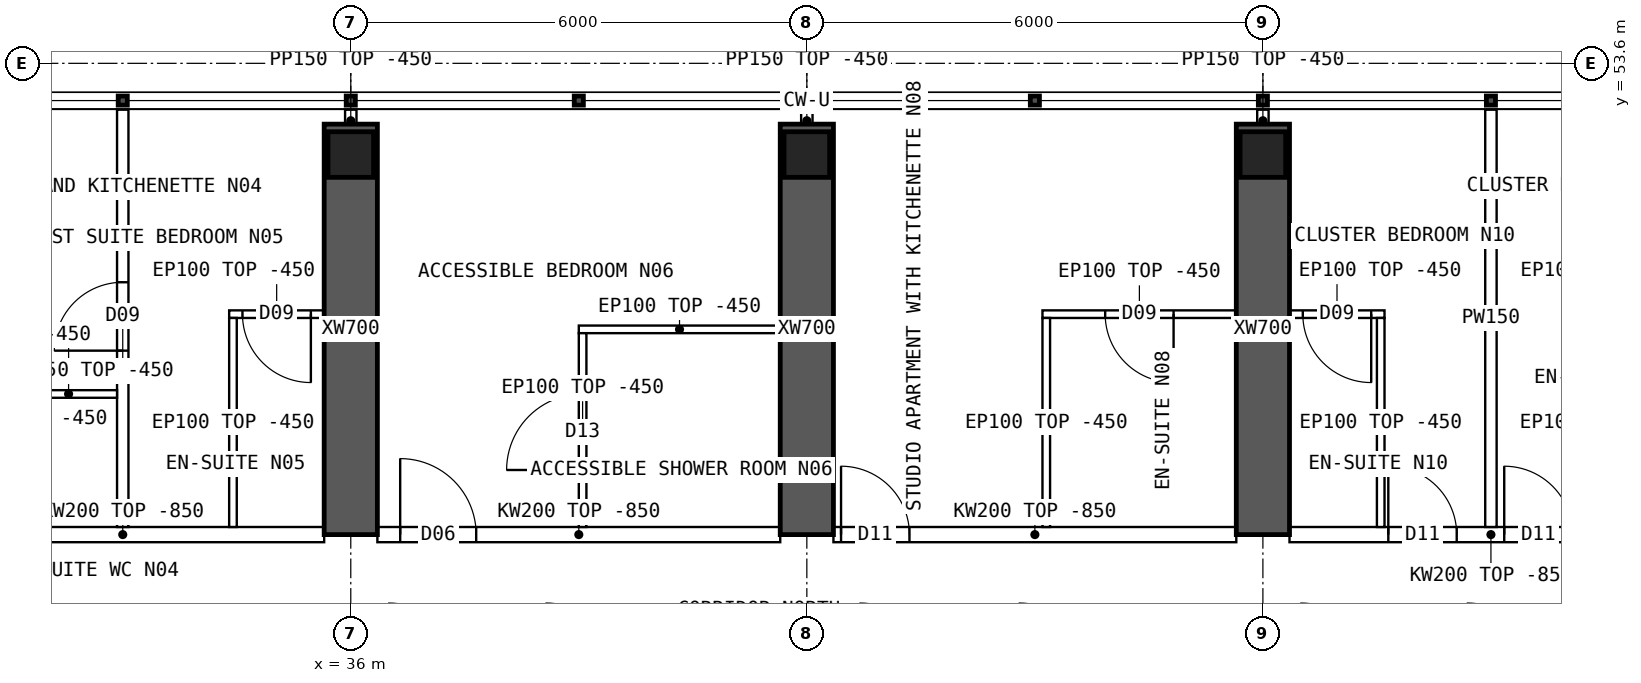
"""IFC4 building model, lengths in metres.
Left out: names, types, materials, properties, quantities, classifications, styles, units other than length and angle.
Written with IfcOpenShell. Run it as: python <this file> out.ifc"""

import sys

from ifc_helpers import new_model, si_unit, direction, frame, frame_2d, origin, origin_2d, place, context, subcontext, project, spatial, polyline, rectangle, hollow_rectangle, outline, extrude, element, fill, save


model = new_model("IFC4")
c1 = context("Model", 3, precision=1e-05, world=origin(), true_north=direction((0.0, 1.0)))
c2 = subcontext(c1, "Body", "Model", "MODEL_VIEW")
j1 = project(units=[si_unit("LENGTHUNIT", "METRE"), si_unit("PLANEANGLEUNIT", "RADIAN")], contexts=[c1])
p1 = place(None, origin())
s1 = spatial("IfcSite", under=j1, at=p1, CompositionType="ELEMENT")
p2 = place(p1, origin())
s2 = spatial("IfcBuilding", under=s1, at=p2, CompositionType="ELEMENT")
p3 = place(p2, frame((0.0, 0.0, 242.8)))
s3 = spatial("IfcBuildingStorey", under=s2, at=p3, CompositionType="ELEMENT", Elevation=242.8)
for number, where, z_axis, x_axis in (
    (1, (36.0, 52.4, 0.0), (0.0, 0.0, 1.0), (1.0, 0.0, 0.0)),
    (2, (42.0, 52.4, 0.0), (0.0, 0.0, 1.0), (1.0, 0.0, 0.0)),
    (3, (48.0, 52.4, 0.0), (0.0, 0.0, 1.0), (1.0, 0.0, 0.0)),
):
    element("IfcColumn", number, at=place(p3, frame(where, z_axis=z_axis, x_axis=x_axis)), inside=s3, PredefinedType="COLUMN", context=c2, shape_type="SweptSolid", body=[
        extrude(hollow_rectangle(XDim=0.6, YDim=0.6, WallThickness=0.06, at=origin_2d()), origin(), (0.0, 0.0, 1.0), 3.75),
    ])
for number, where, z_axis, x_axis in (
    (4, (36.0, 47.4, 0.0), (0.0, 0.0, 1.0), (0.0, 1.0, 0.0)),
    (5, (42.0, 47.4, 0.0), (0.0, 0.0, 1.0), (0.0, 1.0, 0.0)),
    (6, (48.0, 47.4, 0.0), (0.0, 0.0, 1.0), (0.0, 1.0, 0.0)),
):
    element("IfcWall", number, at=place(p3, frame(where, z_axis=z_axis, x_axis=x_axis)), inside=s3, PredefinedType="SHEAR", context=c2, shape_type="SweptSolid", body=[
        extrude(rectangle(XDim=5.4, YDim=0.7, at=frame_2d((2.7, 0.0))), origin(), (0.0, 0.0, 1.0), 3.75),
    ])
p4 = place(p3, frame((30.35, 47.4, 0.0), z_axis=(0.0, 0.0, 1.0), x_axis=(1.0, 0.0, 0.0)))
e7 = element("IfcWall", 7, at=p4, inside=s3, PredefinedType="SOLIDWALL", context=c2, shape_type="SweptSolid", body=[
    extrude(outline(polyline([(0.0, 0.0), (5.3, 0.0), (5.3, 2.9), (0.0, 2.9), (0.0, 0.0)])), frame((0.0, 0.1, 0.0), z_axis=(0.0, -1.0, 0.0), x_axis=(1.0, 0.0, 0.0)), (0.0, 0.0, 1.0), 0.2),
])
p5 = place(p4, frame((0.3, 0.0, 0.0)))
e8 = element("IfcOpeningElement", 8, at=p5, cuts=e7, PredefinedType="OPENING", context=c2, shape_type="SweptSolid", body=[
    extrude(rectangle(XDim=0.9, YDim=2.1, at=frame_2d((0.45, 1.05))), frame((0.0, 0.11, 0.0), z_axis=(0.0, -1.0, 0.0), x_axis=(1.0, 0.0, 0.0)), (0.0, 0.0, 1.0), 0.22),
])
p6 = place(p3, frame((36.35, 47.4, 0.0), z_axis=(0.0, 0.0, 1.0), x_axis=(1.0, 0.0, 0.0)))
e9 = element("IfcWall", 9, at=p6, inside=s3, PredefinedType="SOLIDWALL", context=c2, shape_type="SweptSolid", body=[
    extrude(outline(polyline([(0.0, 0.0), (5.3, 0.0), (5.3, 2.9), (0.0, 2.9), (0.0, 0.0)])), frame((0.0, 0.1, 0.0), z_axis=(0.0, -1.0, 0.0), x_axis=(1.0, 0.0, 0.0)), (0.0, 0.0, 1.0), 0.2),
])
p7 = place(p6, frame((0.3, 0.0, 0.0)))
e10 = element("IfcOpeningElement", 10, at=p7, cuts=e9, PredefinedType="OPENING", context=c2, shape_type="SweptSolid", body=[
    extrude(rectangle(XDim=1.0, YDim=2.1, at=frame_2d((0.5, 1.05))), frame((0.0, 0.11, 0.0), z_axis=(0.0, -1.0, 0.0), x_axis=(1.0, 0.0, 0.0)), (0.0, 0.0, 1.0), 0.22),
])
p8 = place(p3, frame((42.35, 47.4, 0.0), z_axis=(0.0, 0.0, 1.0), x_axis=(1.0, 0.0, 0.0)))
e11 = element("IfcWall", 11, at=p8, inside=s3, PredefinedType="SOLIDWALL", context=c2, shape_type="SweptSolid", body=[
    extrude(outline(polyline([(0.0, 0.0), (5.3, 0.0), (5.3, 2.9), (0.0, 2.9), (0.0, 0.0)])), frame((0.0, 0.1, 0.0), z_axis=(0.0, -1.0, 0.0), x_axis=(1.0, 0.0, 0.0)), (0.0, 0.0, 1.0), 0.2),
])
p9 = place(p8, frame((0.1, 0.0, 0.0)))
e12 = element("IfcOpeningElement", 12, at=p9, cuts=e11, PredefinedType="OPENING", context=c2, shape_type="SweptSolid", body=[
    extrude(rectangle(XDim=0.9, YDim=2.1, at=frame_2d((0.45, 1.05))), frame((0.0, 0.11, 0.0), z_axis=(0.0, -1.0, 0.0), x_axis=(1.0, 0.0, 0.0)), (0.0, 0.0, 1.0), 0.22),
])
p10 = place(p3, frame((48.35, 47.4, 0.0), z_axis=(0.0, 0.0, 1.0), x_axis=(1.0, 0.0, 0.0)))
e13 = element("IfcWall", 13, at=p10, inside=s3, PredefinedType="SOLIDWALL", context=c2, shape_type="SweptSolid", body=[
    extrude(outline(polyline([(0.0, 0.0), (5.3, 0.0), (5.3, 2.9), (0.0, 2.9), (0.0, 0.0)])), frame((0.0, 0.1, 0.0), z_axis=(0.0, -1.0, 0.0), x_axis=(1.0, 0.0, 0.0)), (0.0, 0.0, 1.0), 0.2),
])
p11 = place(p10, frame((1.3, 0.0, 0.0)))
e14 = element("IfcOpeningElement", 14, at=p11, cuts=e13, PredefinedType="OPENING", context=c2, shape_type="SweptSolid", body=[
    extrude(rectangle(XDim=0.9, YDim=2.1, at=frame_2d((0.45, 1.05))), frame((0.0, 0.11, 0.0), z_axis=(0.0, -1.0, 0.0), x_axis=(1.0, 0.0, 0.0)), (0.0, 0.0, 1.0), 0.22),
])
p12 = place(p10, frame((2.825, 0.0, 0.0)))
e15 = element("IfcOpeningElement", 15, at=p12, cuts=e13, PredefinedType="OPENING", context=c2, shape_type="SweptSolid", body=[
    extrude(rectangle(XDim=0.9, YDim=2.1, at=frame_2d((0.45, 1.05))), frame((0.0, 0.11, 0.0), z_axis=(0.0, -1.0, 0.0), x_axis=(1.0, 0.0, 0.0)), (0.0, 0.0, 1.0), 0.22),
])
p13 = place(p3, frame((33.0, 52.99, 0.0), z_axis=(0.0, 0.0, 1.0), x_axis=(0.0, -1.0, 0.0)))
e16 = element("IfcWall", 16, at=p13, inside=s3, PredefinedType="PARTITIONING", context=c2, shape_type="SweptSolid", body=[
    extrude(outline(polyline([(0.0, 0.0), (5.49, 0.0), (5.49, 2.9), (5.442, 2.9), (5.44, 3.3), (0.792, 3.3), (0.79, 2.9), (0.392, 2.9), (0.39, 3.3), (0.0, 3.3), (0.0, 0.0)])), frame((0.0, 0.075, 0.0), z_axis=(0.0, -1.0, 0.0), x_axis=(1.0, 0.0, 0.0)), (0.0, 0.0, 1.0), 0.15),
])
p14 = place(p13, frame((2.27, 0.0, 0.0)))
e17 = element("IfcOpeningElement", 17, at=p14, cuts=e16, PredefinedType="OPENING", context=c2, shape_type="SweptSolid", body=[
    extrude(rectangle(XDim=0.9, YDim=2.1, at=frame_2d((0.45, 1.05))), frame((0.0, 0.085, 0.0), z_axis=(0.0, -1.0, 0.0), x_axis=(1.0, 0.0, 0.0)), (0.0, 0.0, 1.0), 0.17),
])
p15 = place(p3, frame((34.4, 50.3, 0.0), z_axis=(0.0, 0.0, 1.0), x_axis=(1.0, 0.0, 0.0)))
e18 = element("IfcWall", 18, at=p15, inside=s3, PredefinedType="PARTITIONING", context=c2, shape_type="SweptSolid", body=[
    extrude(rectangle(XDim=1.25, YDim=0.1, at=frame_2d((0.625, 0.0))), origin(), (0.0, 0.0, 1.0), 3.3),
])
p16 = place(p15, frame((0.175, 0.0, 0.0)))
e19 = element("IfcOpeningElement", 19, at=p16, cuts=e18, PredefinedType="OPENING", context=c2, shape_type="SweptSolid", body=[
    extrude(rectangle(XDim=0.9, YDim=2.1, at=frame_2d((0.45, 1.05))), frame((0.0, 0.06, 0.0), z_axis=(0.0, -1.0, 0.0), x_axis=(1.0, 0.0, 0.0)), (0.0, 0.0, 1.0), 0.12),
])
p17 = place(p3, frame((34.45, 50.25, 0.0), z_axis=(0.0, 0.0, 1.0), x_axis=(0.0, -1.0, 0.0)))
e20 = element("IfcWall", 20, at=p17, inside=s3, PredefinedType="PARTITIONING", context=c2, shape_type="SweptSolid", body=[
    extrude(outline(polyline([(0.0, 0.0), (2.75, 0.0), (2.75, 2.9), (2.702, 2.9), (2.7, 3.3), (0.0, 3.3), (0.0, 0.0)])), frame((0.0, 0.05, 0.0), z_axis=(0.0, -1.0, 0.0), x_axis=(1.0, 0.0, 0.0)), (0.0, 0.0, 1.0), 0.1),
])
p18 = place(p3, frame((31.65, 49.25, 0.0), z_axis=(0.0, 0.0, 1.0), x_axis=(1.0, 0.0, 0.0)))
e21 = element("IfcWall", 21, at=p18, inside=s3, PredefinedType="PARTITIONING", context=c2, shape_type="SweptSolid", body=[
    extrude(rectangle(XDim=1.275, YDim=0.1, at=frame_2d((0.638, 0.0))), origin(), (0.0, 0.0, 1.0), 3.3),
])
p19 = place(p3, frame((39.0, 50.1, 0.0), z_axis=(0.0, 0.0, 1.0), x_axis=(1.0, 0.0, 0.0)))
e22 = element("IfcWall", 22, at=p19, inside=s3, PredefinedType="PARTITIONING", context=c2, shape_type="SweptSolid", body=[
    extrude(rectangle(XDim=2.65, YDim=0.1, at=frame_2d((1.325, 0.0))), origin(), (0.0, 0.0, 1.0), 3.3),
])
p20 = place(p3, frame((39.05, 50.05, 0.0), z_axis=(0.0, 0.0, 1.0), x_axis=(0.0, -1.0, 0.0)))
e23 = element("IfcWall", 23, at=p20, inside=s3, PredefinedType="PARTITIONING", context=c2, shape_type="SweptSolid", body=[
    extrude(outline(polyline([(0.0, 0.0), (2.55, 0.0), (2.55, 2.9), (2.502, 2.9), (2.5, 3.3), (0.0, 3.3), (0.0, 0.0)])), frame((0.0, 0.05, 0.0), z_axis=(0.0, -1.0, 0.0), x_axis=(1.0, 0.0, 0.0)), (0.0, 0.0, 1.0), 0.1),
])
p21 = place(p20, frame((0.8, 0.0, 0.0)))
e24 = element("IfcOpeningElement", 24, at=p21, cuts=e23, PredefinedType="OPENING", context=c2, shape_type="SweptSolid", body=[
    extrude(rectangle(XDim=1.0, YDim=2.1, at=frame_2d((0.5, 1.05))), frame((0.0, 0.06, 0.0), z_axis=(0.0, -1.0, 0.0), x_axis=(1.0, 0.0, 0.0)), (0.0, 0.0, 1.0), 0.12),
])
p22 = place(p3, frame((45.1, 50.3, 0.0), z_axis=(0.0, 0.0, 1.0), x_axis=(1.0, 0.0, 0.0)))
e25 = element("IfcWall", 25, at=p22, inside=s3, PredefinedType="PARTITIONING", context=c2, shape_type="SweptSolid", body=[
    extrude(rectangle(XDim=2.55, YDim=0.1, at=frame_2d((1.275, 0.0))), origin(), (0.0, 0.0, 1.0), 3.3),
])
p23 = place(p22, frame((0.825, 0.0, 0.0)))
e26 = element("IfcOpeningElement", 26, at=p23, cuts=e25, PredefinedType="OPENING", context=c2, shape_type="SweptSolid", body=[
    extrude(rectangle(XDim=0.9, YDim=2.1, at=frame_2d((0.45, 1.05))), frame((0.0, 0.06, 0.0), z_axis=(0.0, -1.0, 0.0), x_axis=(1.0, 0.0, 0.0)), (0.0, 0.0, 1.0), 0.12),
])
p24 = place(p3, frame((45.15, 50.25, 0.0), z_axis=(0.0, 0.0, 1.0), x_axis=(0.0, -1.0, 0.0)))
e27 = element("IfcWall", 27, at=p24, inside=s3, PredefinedType="PARTITIONING", context=c2, shape_type="SweptSolid", body=[
    extrude(outline(polyline([(0.0, 0.0), (2.75, 0.0), (2.75, 2.9), (2.702, 2.9), (2.7, 3.3), (0.0, 3.3), (0.0, 0.0)])), frame((0.0, 0.05, 0.0), z_axis=(0.0, -1.0, 0.0), x_axis=(1.0, 0.0, 0.0)), (0.0, 0.0, 1.0), 0.1),
])
p25 = place(p3, frame((51.0, 52.99, 0.0), z_axis=(0.0, 0.0, 1.0), x_axis=(0.0, -1.0, 0.0)))
e28 = element("IfcWall", 28, at=p25, inside=s3, PredefinedType="PARTITIONING", context=c2, shape_type="SweptSolid", body=[
    extrude(outline(polyline([(0.0, 0.0), (5.49, 0.0), (5.49, 2.9), (5.442, 2.9), (5.44, 3.3), (0.792, 3.3), (0.79, 2.9), (0.392, 2.9), (0.39, 3.3), (0.0, 3.3), (0.0, 0.0)])), frame((0.0, 0.075, 0.0), z_axis=(0.0, -1.0, 0.0), x_axis=(1.0, 0.0, 0.0)), (0.0, 0.0, 1.0), 0.15),
])
p26 = place(p3, frame((48.35, 50.3, 0.0), z_axis=(0.0, 0.0, 1.0), x_axis=(1.0, 0.0, 0.0)))
e29 = element("IfcWall", 29, at=p26, inside=s3, PredefinedType="PARTITIONING", context=c2, shape_type="SweptSolid", body=[
    extrude(rectangle(XDim=1.25, YDim=0.1, at=frame_2d((0.625, 0.0))), origin(), (0.0, 0.0, 1.0), 3.3),
])
p27 = place(p26, frame((0.175, 0.0, 0.0)))
e30 = element("IfcOpeningElement", 30, at=p27, cuts=e29, PredefinedType="OPENING", context=c2, shape_type="SweptSolid", body=[
    extrude(rectangle(XDim=0.9, YDim=2.1, at=frame_2d((0.45, 1.05))), frame((0.0, 0.06, 0.0), z_axis=(0.0, -1.0, 0.0), x_axis=(1.0, 0.0, 0.0)), (0.0, 0.0, 1.0), 0.12),
])
p28 = place(p3, frame((49.55, 50.25, 0.0), z_axis=(0.0, 0.0, 1.0), x_axis=(0.0, -1.0, 0.0)))
e31 = element("IfcWall", 31, at=p28, inside=s3, PredefinedType="PARTITIONING", context=c2, shape_type="SweptSolid", body=[
    extrude(outline(polyline([(0.0, 0.0), (2.75, 0.0), (2.75, 2.9), (2.702, 2.9), (2.7, 3.3), (0.0, 3.3), (0.0, 0.0)])), frame((0.0, 0.05, 0.0), z_axis=(0.0, -1.0, 0.0), x_axis=(1.0, 0.0, 0.0)), (0.0, 0.0, 1.0), 0.1),
])
for number, where, z_axis, x_axis in (
    (32, (36.0, 52.7, 0.0), (0.0, 0.0, 1.0), (0.0, 1.0, 0.0)),
    (33, (42.0, 52.7, 0.0), (0.0, 0.0, 1.0), (0.0, 1.0, 0.0)),
    (34, (48.0, 52.7, 0.0), (0.0, 0.0, 1.0), (0.0, 1.0, 0.0)),
):
    element("IfcWall", number, at=place(p3, frame(where, z_axis=z_axis, x_axis=x_axis)), inside=s3, PredefinedType="PARTITIONING", context=c2, shape_type="SweptSolid", body=[
        extrude(rectangle(XDim=0.29, YDim=0.15, at=frame_2d((0.145, 0.0))), origin(), (0.0, 0.0, 1.0), 3.3),
    ])
p29 = place(p16, origin())
e35 = element("IfcDoor", 35, at=p29, inside=s3, OperationType="SINGLE_SWING_RIGHT", PredefinedType="DOOR", context=c2, shape_type="SweptSolid", body=[
    extrude(rectangle(XDim=0.9, YDim=2.1, at=frame_2d((0.45, 1.05))), frame((0.0, 0.025, 0.0), z_axis=(0.0, -1.0, 0.0), x_axis=(1.0, 0.0, 0.0)), (0.0, 0.0, 1.0), 0.05),
])
fill(e19, e35)
p30 = place(p14, origin())
e36 = element("IfcDoor", 36, at=p30, inside=s3, OperationType="SINGLE_SWING_RIGHT", PredefinedType="DOOR", context=c2, shape_type="SweptSolid", body=[
    extrude(rectangle(XDim=0.9, YDim=2.1, at=frame_2d((0.45, 1.05))), frame((0.0, 0.025, 0.0), z_axis=(0.0, -1.0, 0.0), x_axis=(1.0, 0.0, 0.0)), (0.0, 0.0, 1.0), 0.05),
])
fill(e17, e36)
p31 = place(p21, origin())
e37 = element("IfcDoor", 37, at=p31, inside=s3, OperationType="SINGLE_SWING_RIGHT", PredefinedType="DOOR", context=c2, shape_type="SweptSolid", body=[
    extrude(rectangle(XDim=1.0, YDim=2.1, at=frame_2d((0.5, 1.05))), frame((0.0, 0.025, 0.0), z_axis=(0.0, -1.0, 0.0), x_axis=(1.0, 0.0, 0.0)), (0.0, 0.0, 1.0), 0.05),
])
fill(e24, e37)
p32 = place(p7, origin())
e38 = element("IfcDoor", 38, at=p32, inside=s3, OperationType="SINGLE_SWING_LEFT", PredefinedType="DOOR", context=c2, shape_type="SweptSolid", body=[
    extrude(rectangle(XDim=1.0, YDim=2.1, at=frame_2d((0.5, 1.05))), frame((0.0, 0.025, 0.0), z_axis=(0.0, -1.0, 0.0), x_axis=(1.0, 0.0, 0.0)), (0.0, 0.0, 1.0), 0.05),
])
fill(e10, e38)
p33 = place(p23, origin())
e39 = element("IfcDoor", 39, at=p33, inside=s3, OperationType="SINGLE_SWING_RIGHT", PredefinedType="DOOR", context=c2, shape_type="SweptSolid", body=[
    extrude(rectangle(XDim=0.9, YDim=2.1, at=frame_2d((0.45, 1.05))), frame((0.0, 0.025, 0.0), z_axis=(0.0, -1.0, 0.0), x_axis=(1.0, 0.0, 0.0)), (0.0, 0.0, 1.0), 0.05),
])
fill(e26, e39)
p34 = place(p9, origin())
e40 = element("IfcDoor", 40, at=p34, inside=s3, OperationType="SINGLE_SWING_LEFT", PredefinedType="DOOR", context=c2, shape_type="SweptSolid", body=[
    extrude(rectangle(XDim=0.9, YDim=2.1, at=frame_2d((0.45, 1.05))), frame((0.0, 0.025, 0.0), z_axis=(0.0, -1.0, 0.0), x_axis=(1.0, 0.0, 0.0)), (0.0, 0.0, 1.0), 0.05),
])
fill(e12, e40)
p35 = place(p27, origin())
e41 = element("IfcDoor", 41, at=p35, inside=s3, OperationType="SINGLE_SWING_RIGHT", PredefinedType="DOOR", context=c2, shape_type="SweptSolid", body=[
    extrude(rectangle(XDim=0.9, YDim=2.1, at=frame_2d((0.45, 1.05))), frame((0.0, 0.025, 0.0), z_axis=(0.0, -1.0, 0.0), x_axis=(1.0, 0.0, 0.0)), (0.0, 0.0, 1.0), 0.05),
])
fill(e30, e41)
p36 = place(p11, origin())
e42 = element("IfcDoor", 42, at=p36, inside=s3, OperationType="SINGLE_SWING_LEFT", PredefinedType="DOOR", context=c2, shape_type="SweptSolid", body=[
    extrude(rectangle(XDim=0.9, YDim=2.1, at=frame_2d((0.45, 1.05))), frame((0.0, 0.025, 0.0), z_axis=(0.0, -1.0, 0.0), x_axis=(1.0, 0.0, 0.0)), (0.0, 0.0, 1.0), 0.05),
])
fill(e14, e42)
p37 = place(p12, origin())
e43 = element("IfcDoor", 43, at=p37, inside=s3, OperationType="SINGLE_SWING_LEFT", PredefinedType="DOOR", context=c2, shape_type="SweptSolid", body=[
    extrude(rectangle(XDim=0.9, YDim=2.1, at=frame_2d((0.45, 1.05))), frame((0.0, 0.025, 0.0), z_axis=(0.0, -1.0, 0.0), x_axis=(1.0, 0.0, 0.0)), (0.0, 0.0, 1.0), 0.05),
])
fill(e15, e43)
save(model, sys.argv[1])
